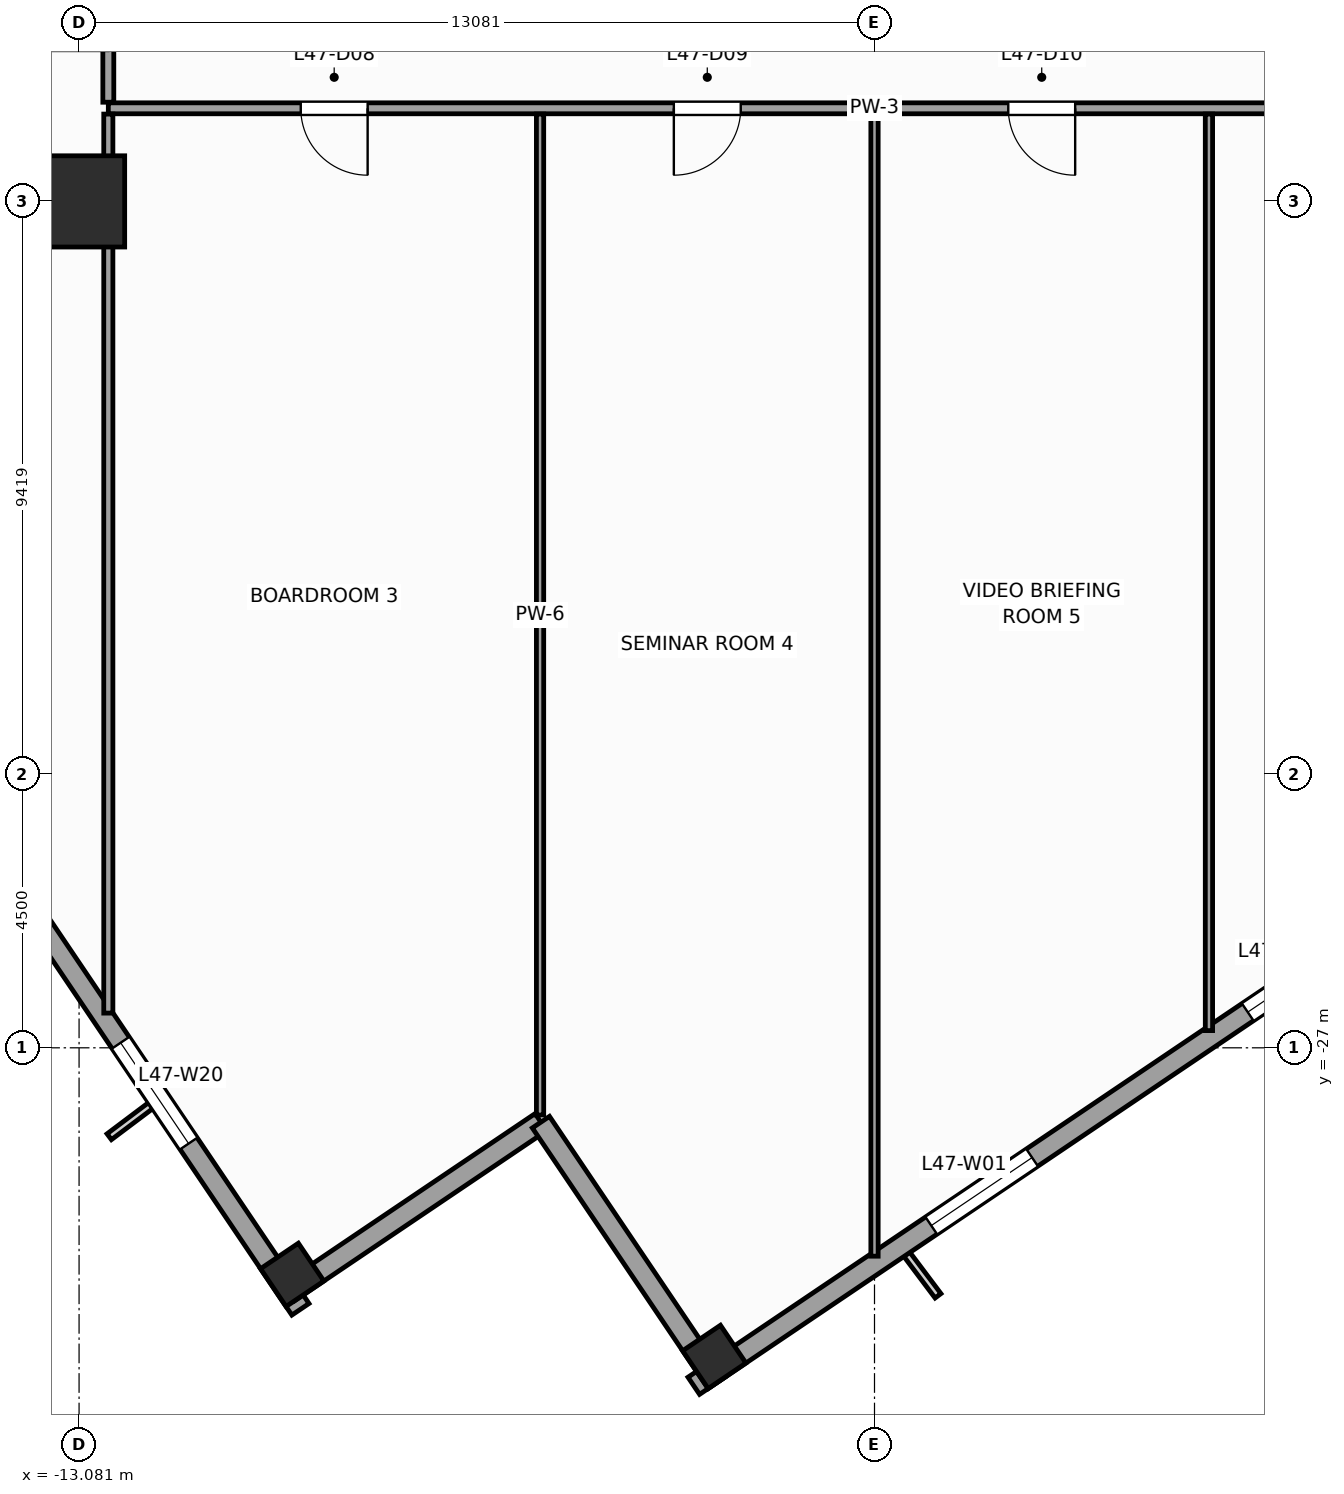
"""IFC4 building model, lengths in metres.
Left out: names, types, materials, properties, quantities, classifications, styles, units other than length and angle.
Written with IfcOpenShell. Run it as: python <this file> out.ifc"""

import sys

from ifc_helpers import new_model, si_unit, direction, frame, frame_2d, origin, origin_2d, place, context, subcontext, project, spatial, rectangle, extrude, source, transform, mapped, element, fill, save


model = new_model("IFC4")
c1 = context("Model", 3, precision=1e-05, world=origin(), true_north=direction((0.0, 1.0)))
c2 = subcontext(c1, "Body", "Model", "MODEL_VIEW")
j1 = project(units=[si_unit("LENGTHUNIT", "METRE"), si_unit("PLANEANGLEUNIT", "RADIAN")], contexts=[c1])
p1 = place(None, origin())
s1 = spatial("IfcSite", under=j1, at=p1, CompositionType="ELEMENT")
p2 = place(p1, origin())
s2 = spatial("IfcBuilding", under=s1, at=p2, CompositionType="ELEMENT")
p3 = place(p2, frame((0.0, 0.0, 196.4)))
s3 = spatial("IfcBuildingStorey", under=s2, at=p3, CompositionType="ELEMENT", Elevation=196.4)
m1 = source(origin(), c2, "Body", "SweptSolid", [
    extrude(rectangle(XDim=1.5, YDim=1.5, at=origin_2d()), origin(), (0.0, 0.0, 1.0), 4.0),
])
p4 = place(p3, frame((-13.081, -13.081, 0.0), z_axis=(0.0, 0.0, 1.0), x_axis=(1.0, 0.0, 0.0)))
e1 = element("IfcColumn", 1, at=p4, inside=s3, PredefinedType="COLUMN", context=c2, shape_type="MappedRepresentation", body=[
    mapped(m1, transform((0.0, 0.0, 0.0), scale=1.0)),
])
m2 = source(origin(), c2, "Body", "SweptSolid", [
    extrude(rectangle(XDim=0.75, YDim=0.75, at=origin_2d()), origin(), (0.0, 0.0, 1.0), 4.0),
])
for number, where, z_axis, x_axis in (
    (2, (-2.635, -32.083, 0.0), (0.0, 0.0, 1.0), (0.829, 0.559, 0.0)),
    (3, (-9.576, -30.734, 0.0), (0.0, 0.0, 1.0), (0.829, 0.559, 0.0)),
):
    element("IfcColumn", number, at=place(p3, frame(where, z_axis=z_axis, x_axis=x_axis)), inside=s3, PredefinedType="COLUMN", context=c2, shape_type="MappedRepresentation", body=[
        mapped(m2, transform((0.0, 0.0, 0.0), scale=1.0)),
    ])
p5 = place(p3, frame((-2.972, -32.558, 0.0), z_axis=(0.0, 0.0, 1.0), x_axis=(0.829036218961, 0.559194910251, 0.0)))
e4 = element("IfcWall", 4, at=p5, inside=s3, PredefinedType="STANDARD", context=c2, shape_type="SweptSolid", body=[
    extrude(rectangle(XDim=41.34, YDim=0.34, at=frame_2d((20.67, 0.0))), origin(), (0.0, 0.0, 1.0), 2.2),
])
p6 = place(p5, frame((25.745, 0.0, 0.0)))
e5 = element("IfcOpeningElement", 5, at=p6, cuts=e4, PredefinedType="OPENING", context=c2, shape_type="SweptSolid", body=[
    extrude(rectangle(XDim=1.05, YDim=2.02, at=frame_2d((0.525, 1.01))), frame((0.0, 0.18, 0.0), z_axis=(0.0, -1.0, 0.0), x_axis=(1.0, 0.0, 0.0)), (0.0, 0.0, 1.0), 0.36),
])
p7 = place(p5, frame((4.711, 0.0, 0.67)))
e6 = element("IfcOpeningElement", 6, at=p7, cuts=e4, PredefinedType="OPENING", context=c2, shape_type="SweptSolid", body=[
    extrude(rectangle(XDim=2.0, YDim=1.45, at=frame_2d((1.0, 0.725))), frame((0.0, 0.18, 0.0), z_axis=(0.0, -1.0, 0.0), x_axis=(1.0, 0.0, 0.0)), (0.0, 0.0, 1.0), 0.36),
])
p8 = place(p5, frame((10.989, 0.0, 0.67)))
e7 = element("IfcOpeningElement", 7, at=p8, cuts=e4, PredefinedType="OPENING", context=c2, shape_type="SweptSolid", body=[
    extrude(rectangle(XDim=2.0, YDim=1.45, at=frame_2d((1.0, 0.725))), frame((0.0, 0.18, 0.0), z_axis=(0.0, -1.0, 0.0), x_axis=(1.0, 0.0, 0.0)), (0.0, 0.0, 1.0), 0.36),
])
p9 = place(p5, frame((16.593, 0.0, 0.67)))
e8 = element("IfcOpeningElement", 8, at=p9, cuts=e4, PredefinedType="OPENING", context=c2, shape_type="SweptSolid", body=[
    extrude(rectangle(XDim=2.0, YDim=1.45, at=frame_2d((1.0, 0.725))), frame((0.0, 0.18, 0.0), z_axis=(0.0, -1.0, 0.0), x_axis=(1.0, 0.0, 0.0)), (0.0, 0.0, 1.0), 0.36),
])
p10 = place(p5, frame((27.861, 0.0, 0.67)))
e9 = element("IfcOpeningElement", 9, at=p10, cuts=e4, PredefinedType="OPENING", context=c2, shape_type="SweptSolid", body=[
    extrude(rectangle(XDim=2.0, YDim=1.45, at=frame_2d((1.0, 0.725))), frame((0.0, 0.18, 0.0), z_axis=(0.0, -1.0, 0.0), x_axis=(1.0, 0.0, 0.0)), (0.0, 0.0, 1.0), 0.36),
])
p11 = place(p5, frame((34.552, 0.0, 0.67)))
e10 = element("IfcOpeningElement", 10, at=p11, cuts=e4, PredefinedType="OPENING", context=c2, shape_type="SweptSolid", body=[
    extrude(rectangle(XDim=2.0, YDim=1.45, at=frame_2d((1.0, 0.725))), frame((0.0, 0.18, 0.0), z_axis=(0.0, -1.0, 0.0), x_axis=(1.0, 0.0, 0.0)), (0.0, 0.0, 1.0), 0.36),
])
p12 = place(p3, frame((-32.558, 2.972, 0.0), z_axis=(0.0, 0.0, 1.0), x_axis=(0.559194910251, -0.829036218961, 0.0)))
e11 = element("IfcWall", 11, at=p12, inside=s3, PredefinedType="STANDARD", context=c2, shape_type="SweptSolid", body=[
    extrude(rectangle(XDim=41.34, YDim=0.34, at=frame_2d((20.67, 0.0))), origin(), (0.0, 0.0, 1.0), 2.2),
])
p13 = place(p12, frame((5.461, 0.0, 0.67)))
e12 = element("IfcOpeningElement", 12, at=p13, cuts=e11, PredefinedType="OPENING", context=c2, shape_type="SweptSolid", body=[
    extrude(rectangle(XDim=2.0, YDim=1.45, at=frame_2d((1.0, 0.725))), frame((0.0, 0.18, 0.0), z_axis=(0.0, -1.0, 0.0), x_axis=(1.0, 0.0, 0.0)), (0.0, 0.0, 1.0), 0.36),
])
p14 = place(p12, frame((10.989, 0.0, 0.67)))
e13 = element("IfcOpeningElement", 13, at=p14, cuts=e11, PredefinedType="OPENING", context=c2, shape_type="SweptSolid", body=[
    extrude(rectangle(XDim=2.0, YDim=1.45, at=frame_2d((1.0, 0.725))), frame((0.0, 0.18, 0.0), z_axis=(0.0, -1.0, 0.0), x_axis=(1.0, 0.0, 0.0)), (0.0, 0.0, 1.0), 0.36),
])
p15 = place(p12, frame((17.343, 0.0, 0.67)))
e14 = element("IfcOpeningElement", 14, at=p15, cuts=e11, PredefinedType="OPENING", context=c2, shape_type="SweptSolid", body=[
    extrude(rectangle(XDim=2.0, YDim=1.45, at=frame_2d((1.0, 0.725))), frame((0.0, 0.18, 0.0), z_axis=(0.0, -1.0, 0.0), x_axis=(1.0, 0.0, 0.0)), (0.0, 0.0, 1.0), 0.36),
])
p16 = place(p12, frame((27.111, 0.0, 0.67)))
e15 = element("IfcOpeningElement", 15, at=p16, cuts=e11, PredefinedType="OPENING", context=c2, shape_type="SweptSolid", body=[
    extrude(rectangle(XDim=2.0, YDim=1.45, at=frame_2d((1.0, 0.725))), frame((0.0, 0.18, 0.0), z_axis=(0.0, -1.0, 0.0), x_axis=(1.0, 0.0, 0.0)), (0.0, 0.0, 1.0), 0.36),
])
p17 = place(p12, frame((36.052, 0.0, 0.67)))
e16 = element("IfcOpeningElement", 16, at=p17, cuts=e11, PredefinedType="OPENING", context=c2, shape_type="SweptSolid", body=[
    extrude(rectangle(XDim=2.0, YDim=1.45, at=frame_2d((1.0, 0.725))), frame((0.0, 0.18, 0.0), z_axis=(0.0, -1.0, 0.0), x_axis=(1.0, 0.0, 0.0)), (0.0, 0.0, 1.0), 0.36),
])
p18 = place(p3, frame((-9.631, -31.019, 0.0), z_axis=(0.0, 0.0, 1.0), x_axis=(0.829025804298, 0.559210350234, 0.0)))
e17 = element("IfcWall", 17, at=p18, inside=s3, PredefinedType="STANDARD", context=c2, shape_type="SweptSolid", body=[
    extrude(rectangle(XDim=5.0, YDim=0.34, at=frame_2d((2.5, 0.0))), origin(), (0.0, 0.0, 1.0), 3.6),
])
p19 = place(p3, frame((-5.486, -28.223, 0.0), z_axis=(0.0, 0.0, 1.0), x_axis=(0.559171107879, -0.82905227345, 0.0)))
e18 = element("IfcWall", 18, at=p19, inside=s3, PredefinedType="STANDARD", context=c2, shape_type="SweptSolid", body=[
    extrude(rectangle(XDim=5.17, YDim=0.34, at=frame_2d((2.585, 0.0))), origin(), (0.0, 0.0, 1.0), 2.2),
])
p20 = place(p3, frame((-12.6, -11.55, 0.0), z_axis=(0.0, 0.0, 1.0), x_axis=(1.0, 0.0, 0.0)))
e19 = element("IfcWall", 19, at=p20, inside=s3, PredefinedType="PARTITIONING", context=c2, shape_type="SweptSolid", body=[
    extrude(rectangle(XDim=25.2, YDim=0.18, at=frame_2d((12.6, 0.0))), origin(), (0.0, 0.0, 1.0), 3.6),
])
p21 = place(p20, frame((3.165, 0.0, 0.0)))
e20 = element("IfcOpeningElement", 20, at=p21, cuts=e19, PredefinedType="OPENING", context=c2, shape_type="SweptSolid", body=[
    extrude(rectangle(XDim=1.1, YDim=2.2, at=frame_2d((0.55, 1.1))), frame((0.0, 0.1, 0.0), z_axis=(0.0, -1.0, 0.0), x_axis=(1.0, 0.0, 0.0)), (0.0, 0.0, 1.0), 0.2),
])
p22 = place(p20, frame((9.3, 0.0, 0.0)))
e21 = element("IfcOpeningElement", 21, at=p22, cuts=e19, PredefinedType="OPENING", context=c2, shape_type="SweptSolid", body=[
    extrude(rectangle(XDim=1.1, YDim=2.2, at=frame_2d((0.55, 1.1))), frame((0.0, 0.1, 0.0), z_axis=(0.0, -1.0, 0.0), x_axis=(1.0, 0.0, 0.0)), (0.0, 0.0, 1.0), 0.2),
])
p23 = place(p20, frame((14.8, 0.0, 0.0)))
e22 = element("IfcOpeningElement", 22, at=p23, cuts=e19, PredefinedType="OPENING", context=c2, shape_type="SweptSolid", body=[
    extrude(rectangle(XDim=1.1, YDim=2.2, at=frame_2d((0.55, 1.1))), frame((0.0, 0.1, 0.0), z_axis=(0.0, -1.0, 0.0), x_axis=(1.0, 0.0, 0.0)), (0.0, 0.0, 1.0), 0.2),
])
p24 = place(p20, frame((20.936, 0.0, 0.0)))
e23 = element("IfcOpeningElement", 23, at=p24, cuts=e19, PredefinedType="OPENING", context=c2, shape_type="SweptSolid", body=[
    extrude(rectangle(XDim=1.1, YDim=2.2, at=frame_2d((0.55, 1.1))), frame((0.0, 0.1, 0.0), z_axis=(0.0, -1.0, 0.0), x_axis=(1.0, 0.0, 0.0)), (0.0, 0.0, 1.0), 0.2),
])
p25 = place(p3, frame((-12.6, -11.45, 0.0), z_axis=(0.0, 0.0, 1.0), x_axis=(0.0, 1.0, 0.0)))
e24 = element("IfcWall", 24, at=p25, inside=s3, PredefinedType="PARTITIONING", context=c2, shape_type="SweptSolid", body=[
    extrude(rectangle(XDim=13.05, YDim=0.18, at=frame_2d((6.525, 0.0))), origin(), (0.0, 0.0, 1.0), 2.56),
])
p26 = place(p25, frame((1.455, 0.0, 0.0)))
e25 = element("IfcOpeningElement", 25, at=p26, cuts=e24, PredefinedType="OPENING", context=c2, shape_type="SweptSolid", body=[
    extrude(rectangle(XDim=0.95, YDim=2.1, at=frame_2d((0.475, 1.05))), frame((0.0, 0.1, 0.0), z_axis=(0.0, -1.0, 0.0), x_axis=(1.0, 0.0, 0.0)), (0.0, 0.0, 1.0), 0.2),
])
p27 = place(p25, frame((3.879, 0.0, 0.0)))
e26 = element("IfcOpeningElement", 26, at=p27, cuts=e24, PredefinedType="OPENING", context=c2, shape_type="SweptSolid", body=[
    extrude(rectangle(XDim=0.95, YDim=2.1, at=frame_2d((0.475, 1.05))), frame((0.0, 0.1, 0.0), z_axis=(0.0, -1.0, 0.0), x_axis=(1.0, 0.0, 0.0)), (0.0, 0.0, 1.0), 0.2),
])
p28 = place(p25, frame((11.01, 0.0, 0.0)))
e27 = element("IfcOpeningElement", 27, at=p28, cuts=e24, PredefinedType="OPENING", context=c2, shape_type="SweptSolid", body=[
    extrude(rectangle(XDim=1.1, YDim=2.2, at=frame_2d((0.55, 1.1))), frame((0.0, 0.1, 0.0), z_axis=(0.0, -1.0, 0.0), x_axis=(1.0, 0.0, 0.0)), (0.0, 0.0, 1.0), 0.2),
])
p29 = place(p25, frame((7.384, 0.0, 0.0)))
e28 = element("IfcOpeningElement", 28, at=p29, cuts=e24, PredefinedType="OPENING", context=c2, shape_type="SweptSolid", body=[
    extrude(rectangle(XDim=1.1, YDim=2.2, at=frame_2d((0.55, 1.1))), frame((0.0, 0.1, 0.0), z_axis=(0.0, -1.0, 0.0), x_axis=(1.0, 0.0, 0.0)), (0.0, 0.0, 1.0), 0.2),
])
p30 = place(p3, frame((-12.6, -26.429, 0.0), z_axis=(0.0, 0.0, 1.0), x_axis=(0.0, 1.0, 0.0)))
e29 = element("IfcWall", 29, at=p30, inside=s3, PredefinedType="PARTITIONING", context=c2, shape_type="SweptSolid", body=[
    extrude(rectangle(XDim=14.784, YDim=0.15, at=frame_2d((7.392, 0.0))), origin(), (0.0, 0.0, 1.0), 2.2),
])
p31 = place(p3, frame((-5.5, -28.105, 0.0), z_axis=(0.0, 0.0, 1.0), x_axis=(0.0, 1.0, 0.0)))
e30 = element("IfcWall", 30, at=p31, inside=s3, PredefinedType="PARTITIONING", context=c2, shape_type="SweptSolid", body=[
    extrude(rectangle(XDim=16.46, YDim=0.12, at=frame_2d((8.23, 0.0))), origin(), (0.0, 0.0, 1.0), 3.6),
])
p32 = place(p3, frame((0.0, -30.427, 0.0), z_axis=(0.0, 0.0, 1.0), x_axis=(0.0, 1.0, 0.0)))
e31 = element("IfcWall", 31, at=p32, inside=s3, PredefinedType="PARTITIONING", context=c2, shape_type="SweptSolid", body=[
    extrude(rectangle(XDim=18.782, YDim=0.12, at=frame_2d((9.391, 0.0))), origin(), (0.0, 0.0, 1.0), 3.6),
])
p33 = place(p3, frame((5.5, -26.717, 0.0), z_axis=(0.0, 0.0, 1.0), x_axis=(0.0, 1.0, 0.0)))
e32 = element("IfcWall", 32, at=p33, inside=s3, PredefinedType="PARTITIONING", context=c2, shape_type="SweptSolid", body=[
    extrude(rectangle(XDim=15.072, YDim=0.12, at=frame_2d((7.536, 0.0))), origin(), (0.0, 0.0, 1.0), 3.6),
])
m3 = source(origin(), c2, "Body", "SweptSolid", [
    extrude(rectangle(XDim=2.0, YDim=1.45, at=frame_2d((1.0, 0.725))), frame((0.0, 0.03, 0.0), z_axis=(0.0, -1.0, 0.0), x_axis=(1.0, 0.0, 0.0)), (0.0, 0.0, 1.0), 0.06),
])
p34 = place(p7, origin())
e33 = element("IfcWindow", 33, at=p34, inside=s3, PartitioningType="SINGLE_PANEL", PredefinedType="WINDOW", context=c2, shape_type="MappedRepresentation", body=[
    mapped(m3, transform((0.0, 0.0, 0.0), scale=1.0)),
])
fill(e6, e33)
p35 = place(p8, origin())
e34 = element("IfcWindow", 34, at=p35, inside=s3, PartitioningType="SINGLE_PANEL", PredefinedType="WINDOW", context=c2, shape_type="MappedRepresentation", body=[
    mapped(m3, transform((0.0, 0.0, 0.0), scale=1.0)),
])
fill(e7, e34)
p36 = place(p17, origin())
e35 = element("IfcWindow", 35, at=p36, inside=s3, PartitioningType="SINGLE_PANEL", PredefinedType="WINDOW", context=c2, shape_type="MappedRepresentation", body=[
    mapped(m3, transform((0.0, 0.0, 0.0), scale=1.0)),
])
fill(e16, e35)
m4 = source(origin(), c2, "Body", "SweptSolid", [
    extrude(rectangle(XDim=1.1, YDim=2.2, at=frame_2d((0.55, 1.1))), frame((0.0, 0.025, 0.0), z_axis=(0.0, -1.0, 0.0), x_axis=(1.0, 0.0, 0.0)), (0.0, 0.0, 1.0), 0.05),
])
p37 = place(p21, frame((1.1, 0.0, 0.0), z_axis=(0.0, 0.0, 1.0), x_axis=(-1.0, 0.0, 0.0)))
e36 = element("IfcDoor", 36, at=p37, inside=s3, OperationType="SINGLE_SWING_RIGHT", PredefinedType="DOOR", context=c2, shape_type="MappedRepresentation", body=[
    mapped(m4, transform((0.0, 0.0, 0.0), scale=1.0)),
])
fill(e20, e36)
p38 = place(p22, frame((1.1, 0.0, 0.0), z_axis=(0.0, 0.0, 1.0), x_axis=(-1.0, 0.0, 0.0)))
e37 = element("IfcDoor", 37, at=p38, inside=s3, OperationType="SINGLE_SWING_LEFT", PredefinedType="DOOR", context=c2, shape_type="MappedRepresentation", body=[
    mapped(m4, transform((0.0, 0.0, 0.0), scale=1.0)),
])
fill(e21, e37)
p39 = place(p23, frame((1.1, 0.0, 0.0), z_axis=(0.0, 0.0, 1.0), x_axis=(-1.0, 0.0, 0.0)))
e38 = element("IfcDoor", 38, at=p39, inside=s3, OperationType="SINGLE_SWING_RIGHT", PredefinedType="DOOR", context=c2, shape_type="MappedRepresentation", body=[
    mapped(m4, transform((0.0, 0.0, 0.0), scale=1.0)),
])
fill(e22, e38)
save(model, sys.argv[1])
